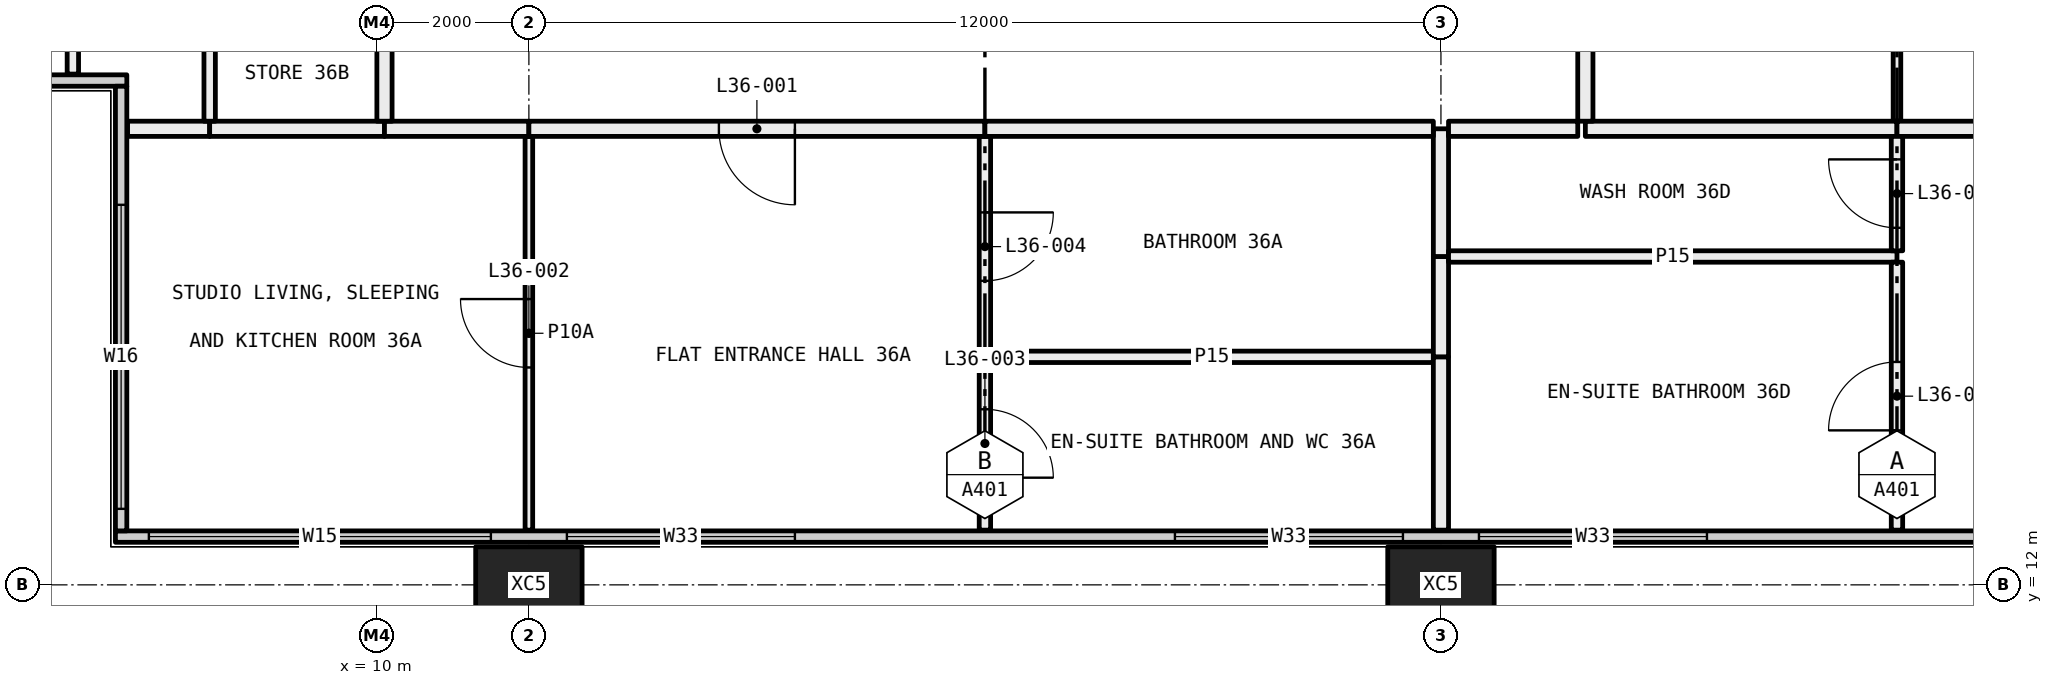
"""IFC4 building model, lengths in metres.
Left out: names, types, materials, properties, quantities, classifications, styles, units other than length and angle.
Written with IfcOpenShell. Run it as: python <this file> out.ifc"""

import sys

from ifc_helpers import new_model, si_unit, direction, frame, frame_2d, origin, origin_2d, place, context, subcontext, project, spatial, rectangle, hollow_rectangle, extrude, element, fill, save


model = new_model("IFC4")
c1 = context("Model", 3, precision=1e-05, world=origin(), true_north=direction((0.0, 1.0)))
c2 = subcontext(c1, "Body", "Model", "MODEL_VIEW")
j1 = project(units=[si_unit("LENGTHUNIT", "METRE"), si_unit("PLANEANGLEUNIT", "RADIAN")], contexts=[c1])
p1 = place(None, origin())
s1 = spatial("IfcSite", under=j1, at=p1, CompositionType="ELEMENT")
p2 = place(p1, origin())
s2 = spatial("IfcBuilding", under=s1, at=p2, CompositionType="ELEMENT")
p3 = place(p2, frame((0.0, 0.0, 138.0)))
s3 = spatial("IfcBuildingStorey", under=s2, at=p3, CompositionType="ELEMENT", Elevation=138.0)
for number, where, z_axis, x_axis in (
    (1, (12.0, 12.0, -0.4), (0.0, 0.0, 1.0), (1.0, 0.0, 0.0)),
    (2, (24.0, 12.0, -0.4), (0.0, 0.0, 1.0), (1.0, 0.0, 0.0)),
):
    element("IfcColumn", number, at=place(p3, frame(where, z_axis=z_axis, x_axis=x_axis)), inside=s3, PredefinedType="COLUMN", context=c2, shape_type="SweptSolid", body=[
        extrude(hollow_rectangle(XDim=1.4, YDim=1.0, WallThickness=0.055, at=origin_2d()), origin(), (0.0, 0.0, 1.0), 3.45),
    ])
p4 = place(p3, frame((6.56, 12.635, 0.0), z_axis=(0.0, 0.0, 1.0), x_axis=(1.0, 0.0, 0.0)))
e3 = element("IfcWall", 3, at=p4, inside=s3, PredefinedType="ELEMENTEDWALL", context=c2, shape_type="SweptSolid", body=[
    extrude(rectangle(XDim=58.88, YDim=0.15, at=frame_2d((29.44, 0.0))), origin(), (0.0, 0.0, 1.0), 3.05),
])
p5 = place(p4, frame((0.44, 0.0, 0.45)))
e4 = element("IfcOpeningElement", 4, at=p5, cuts=e3, PredefinedType="OPENING", context=c2, shape_type="SweptSolid", body=[
    extrude(rectangle(XDim=4.5, YDim=2.55, at=frame_2d((2.25, 1.275))), frame((0.0, 0.085, 0.0), z_axis=(0.0, -1.0, 0.0), x_axis=(1.0, 0.0, 0.0)), (0.0, 0.0, 1.0), 0.17),
])
p6 = place(p4, frame((5.94, 0.0, 0.45)))
e5 = element("IfcOpeningElement", 5, at=p6, cuts=e3, PredefinedType="OPENING", context=c2, shape_type="SweptSolid", body=[
    extrude(rectangle(XDim=3.0, YDim=2.55, at=frame_2d((1.5, 1.275))), frame((0.0, 0.085, 0.0), z_axis=(0.0, -1.0, 0.0), x_axis=(1.0, 0.0, 0.0)), (0.0, 0.0, 1.0), 0.17),
])
p7 = place(p4, frame((13.94, 0.0, 0.45)))
e6 = element("IfcOpeningElement", 6, at=p7, cuts=e3, PredefinedType="OPENING", context=c2, shape_type="SweptSolid", body=[
    extrude(rectangle(XDim=3.0, YDim=2.55, at=frame_2d((1.5, 1.275))), frame((0.0, 0.085, 0.0), z_axis=(0.0, -1.0, 0.0), x_axis=(1.0, 0.0, 0.0)), (0.0, 0.0, 1.0), 0.17),
])
p8 = place(p4, frame((17.94, 0.0, 0.45)))
e7 = element("IfcOpeningElement", 7, at=p8, cuts=e3, PredefinedType="OPENING", context=c2, shape_type="SweptSolid", body=[
    extrude(rectangle(XDim=3.0, YDim=2.55, at=frame_2d((1.5, 1.275))), frame((0.0, 0.085, 0.0), z_axis=(0.0, -1.0, 0.0), x_axis=(1.0, 0.0, 0.0)), (0.0, 0.0, 1.0), 0.17),
])
p9 = place(p4, frame((26.94, 0.0, 0.45)))
e8 = element("IfcOpeningElement", 8, at=p9, cuts=e3, PredefinedType="OPENING", context=c2, shape_type="SweptSolid", body=[
    extrude(rectangle(XDim=2.0, YDim=2.55, at=frame_2d((1.0, 1.275))), frame((0.0, 0.085, 0.0), z_axis=(0.0, -1.0, 0.0), x_axis=(1.0, 0.0, 0.0)), (0.0, 0.0, 1.0), 0.17),
])
p10 = place(p4, frame((29.94, 0.0, 0.45)))
e9 = element("IfcOpeningElement", 9, at=p10, cuts=e3, PredefinedType="OPENING", context=c2, shape_type="SweptSolid", body=[
    extrude(rectangle(XDim=3.0, YDim=2.55, at=frame_2d((1.5, 1.275))), frame((0.0, 0.085, 0.0), z_axis=(0.0, -1.0, 0.0), x_axis=(1.0, 0.0, 0.0)), (0.0, 0.0, 1.0), 0.17),
])
p11 = place(p4, frame((37.94, 0.0, 0.45)))
e10 = element("IfcOpeningElement", 10, at=p11, cuts=e3, PredefinedType="OPENING", context=c2, shape_type="SweptSolid", body=[
    extrude(rectangle(XDim=3.0, YDim=2.55, at=frame_2d((1.5, 1.275))), frame((0.0, 0.085, 0.0), z_axis=(0.0, -1.0, 0.0), x_axis=(1.0, 0.0, 0.0)), (0.0, 0.0, 1.0), 0.17),
])
p12 = place(p4, frame((41.94, 0.0, 0.45)))
e11 = element("IfcOpeningElement", 11, at=p12, cuts=e3, PredefinedType="OPENING", context=c2, shape_type="SweptSolid", body=[
    extrude(rectangle(XDim=3.0, YDim=2.55, at=frame_2d((1.5, 1.275))), frame((0.0, 0.085, 0.0), z_axis=(0.0, -1.0, 0.0), x_axis=(1.0, 0.0, 0.0)), (0.0, 0.0, 1.0), 0.17),
])
p13 = place(p4, frame((50.94, 0.0, 0.45)))
e12 = element("IfcOpeningElement", 12, at=p13, cuts=e3, PredefinedType="OPENING", context=c2, shape_type="SweptSolid", body=[
    extrude(rectangle(XDim=2.0, YDim=2.55, at=frame_2d((1.0, 1.275))), frame((0.0, 0.085, 0.0), z_axis=(0.0, -1.0, 0.0), x_axis=(1.0, 0.0, 0.0)), (0.0, 0.0, 1.0), 0.17),
])
p14 = place(p4, frame((53.94, 0.0, 0.45)))
e13 = element("IfcOpeningElement", 13, at=p14, cuts=e3, PredefinedType="OPENING", context=c2, shape_type="SweptSolid", body=[
    extrude(rectangle(XDim=4.5, YDim=2.55, at=frame_2d((2.25, 1.275))), frame((0.0, 0.085, 0.0), z_axis=(0.0, -1.0, 0.0), x_axis=(1.0, 0.0, 0.0)), (0.0, 0.0, 1.0), 0.17),
])
p15 = place(p3, frame((0.56, 18.635, 0.0), z_axis=(0.0, 0.0, 1.0), x_axis=(1.0, 0.0, 0.0)))
e14 = element("IfcWall", 14, at=p15, inside=s3, PredefinedType="ELEMENTEDWALL", context=c2, shape_type="SweptSolid", body=[
    extrude(rectangle(XDim=6.15, YDim=0.15, at=frame_2d((3.075, 0.0))), origin(), (0.0, 0.0, 1.0), 3.05),
])
p16 = place(p15, frame((0.44, 0.0, 0.45)))
e15 = element("IfcOpeningElement", 15, at=p16, cuts=e14, PredefinedType="OPENING", context=c2, shape_type="SweptSolid", body=[
    extrude(rectangle(XDim=4.0, YDim=2.55, at=frame_2d((2.0, 1.275))), frame((0.0, 0.085, 0.0), z_axis=(0.0, -1.0, 0.0), x_axis=(1.0, 0.0, 0.0)), (0.0, 0.0, 1.0), 0.17),
])
p17 = place(p3, frame((6.635, 12.71, 0.0), z_axis=(0.0, 0.0, 1.0), x_axis=(0.0, 1.0, 0.0)))
e16 = element("IfcWall", 16, at=p17, inside=s3, PredefinedType="ELEMENTEDWALL", context=c2, shape_type="SweptSolid", body=[
    extrude(rectangle(XDim=5.85, YDim=0.15, at=frame_2d((2.925, 0.0))), origin(), (0.0, 0.0, 1.0), 3.05),
])
p18 = place(p17, frame((0.29, 0.0, 0.45)))
e17 = element("IfcOpeningElement", 17, at=p18, cuts=e16, PredefinedType="OPENING", context=c2, shape_type="SweptSolid", body=[
    extrude(rectangle(XDim=4.0, YDim=2.55, at=frame_2d((2.0, 1.275))), frame((0.0, 0.085, 0.0), z_axis=(0.0, -1.0, 0.0), x_axis=(1.0, 0.0, 0.0)), (0.0, 0.0, 1.0), 0.17),
])
p19 = place(p3, frame((12.0, 12.72, 0.0), z_axis=(0.0, 0.0, 1.0), x_axis=(0.0, 1.0, 0.0)))
e18 = element("IfcWall", 18, at=p19, inside=s3, PredefinedType="PARTITIONING", context=c2, shape_type="SweptSolid", body=[
    extrude(rectangle(XDim=5.18, YDim=0.1, at=frame_2d((2.59, 0.0))), origin(), (0.0, 0.0, 1.0), 3.05),
])
p20 = place(p19, frame((2.14, 0.0, 0.0)))
e19 = element("IfcOpeningElement", 19, at=p20, cuts=e18, PredefinedType="OPENING", context=c2, shape_type="SweptSolid", body=[
    extrude(rectangle(XDim=0.9, YDim=2.1, at=frame_2d((0.45, 1.05))), frame((0.0, 0.06, 0.0), z_axis=(0.0, -1.0, 0.0), x_axis=(1.0, 0.0, 0.0)), (0.0, 0.0, 1.0), 0.12),
])
p21 = place(p3, frame((7.8, 18.0, 0.0), z_axis=(0.0, 0.0, 1.0), x_axis=(-1.0, 0.0, 0.0)))
e20 = element("IfcWall", 20, at=p21, inside=s3, PredefinedType="PARTITIONING", context=c2, shape_type="SweptSolid", body=[
    extrude(rectangle(XDim=1.08, YDim=0.2, at=frame_2d((0.54, 0.0))), origin(), (0.0, 0.0, 1.0), 3.05),
])
p22 = place(p3, frame((10.1, 18.0, 0.0), z_axis=(0.0, 0.0, 1.0), x_axis=(-1.0, 0.0, 0.0)))
e21 = element("IfcWall", 21, at=p22, inside=s3, PredefinedType="PARTITIONING", context=c2, shape_type="SweptSolid", body=[
    extrude(rectangle(XDim=2.3, YDim=0.2, at=frame_2d((1.15, 0.0))), origin(), (0.0, 0.0, 1.0), 3.05),
])
p23 = place(p3, frame((12.0, 18.0, 0.0), z_axis=(0.0, 0.0, 1.0), x_axis=(-1.0, 0.0, 0.0)))
e22 = element("IfcWall", 22, at=p23, inside=s3, PredefinedType="PARTITIONING", context=c2, shape_type="SweptSolid", body=[
    extrude(rectangle(XDim=1.9, YDim=0.2, at=frame_2d((0.95, 0.0))), origin(), (0.0, 0.0, 1.0), 3.05),
])
p24 = place(p3, frame((18.0, 12.72, 0.0), z_axis=(0.0, 0.0, 1.0), x_axis=(0.0, 1.0, 0.0)))
e23 = element("IfcWall", 23, at=p24, inside=s3, PredefinedType="PARTITIONING", context=c2, shape_type="SweptSolid", body=[
    extrude(rectangle(XDim=2.28, YDim=0.15, at=frame_2d((1.14, 0.0))), origin(), (0.0, 0.0, 1.0), 3.05),
])
p25 = place(p24, frame((0.69, 0.0, 0.0)))
e24 = element("IfcOpeningElement", 24, at=p25, cuts=e23, PredefinedType="OPENING", context=c2, shape_type="SweptSolid", body=[
    extrude(rectangle(XDim=0.9, YDim=2.1, at=frame_2d((0.45, 1.05))), frame((0.0, 0.085, 0.0), z_axis=(0.0, -1.0, 0.0), x_axis=(1.0, 0.0, 0.0)), (0.0, 0.0, 1.0), 0.17),
])
p26 = place(p3, frame((18.0, 15.0, 0.0), z_axis=(0.0, 0.0, 1.0), x_axis=(0.0, 1.0, 0.0)))
e25 = element("IfcWall", 25, at=p26, inside=s3, PredefinedType="PARTITIONING", context=c2, shape_type="SweptSolid", body=[
    extrude(rectangle(XDim=2.9, YDim=0.15, at=frame_2d((1.45, 0.0))), origin(), (0.0, 0.0, 1.0), 3.05),
])
p27 = place(p26, frame((1.0, 0.0, 0.0)))
e26 = element("IfcOpeningElement", 26, at=p27, cuts=e25, PredefinedType="OPENING", context=c2, shape_type="SweptSolid", body=[
    extrude(rectangle(XDim=0.9, YDim=2.1, at=frame_2d((0.45, 1.05))), frame((0.0, 0.085, 0.0), z_axis=(0.0, -1.0, 0.0), x_axis=(1.0, 0.0, 0.0)), (0.0, 0.0, 1.0), 0.17),
])
p28 = place(p3, frame((18.0, 18.0, 0.0), z_axis=(0.0, 0.0, 1.0), x_axis=(-1.0, 0.0, 0.0)))
e27 = element("IfcWall", 27, at=p28, inside=s3, PredefinedType="PARTITIONING", context=c2, shape_type="SweptSolid", body=[
    extrude(rectangle(XDim=6.0, YDim=0.2, at=frame_2d((3.0, 0.0))), origin(), (0.0, 0.0, 1.0), 3.05),
])
p29 = place(p28, frame((2.5, 0.0, 0.0)))
e28 = element("IfcOpeningElement", 28, at=p29, cuts=e27, PredefinedType="OPENING", context=c2, shape_type="SweptSolid", body=[
    extrude(rectangle(XDim=1.0, YDim=2.1, at=frame_2d((0.5, 1.05))), frame((0.0, 0.11, 0.0), z_axis=(0.0, -1.0, 0.0), x_axis=(1.0, 0.0, 0.0)), (0.0, 0.0, 1.0), 0.22),
])
p30 = place(p3, frame((23.9, 15.0, 0.0), z_axis=(0.0, 0.0, 1.0), x_axis=(-1.0, 0.0, 0.0)))
e29 = element("IfcWall", 29, at=p30, inside=s3, PredefinedType="PARTITIONING", context=c2, shape_type="SweptSolid", body=[
    extrude(rectangle(XDim=5.825, YDim=0.15, at=frame_2d((2.913, 0.0))), origin(), (0.0, 0.0, 1.0), 3.05),
])
p31 = place(p3, frame((24.0, 12.72, 0.0), z_axis=(0.0, 0.0, 1.0), x_axis=(0.0, 1.0, 0.0)))
e30 = element("IfcWall", 30, at=p31, inside=s3, PredefinedType="PARTITIONING", context=c2, shape_type="SweptSolid", body=[
    extrude(rectangle(XDim=2.28, YDim=0.2, at=frame_2d((1.14, 0.0))), origin(), (0.0, 0.0, 1.0), 3.05),
])
p32 = place(p3, frame((24.0, 15.0, 0.0), z_axis=(0.0, 0.0, 1.0), x_axis=(0.0, 1.0, 0.0)))
e31 = element("IfcWall", 31, at=p32, inside=s3, PredefinedType="PARTITIONING", context=c2, shape_type="SweptSolid", body=[
    extrude(rectangle(XDim=1.32, YDim=0.2, at=frame_2d((0.66, 0.0))), origin(), (0.0, 0.0, 1.0), 3.05),
])
p33 = place(p3, frame((24.0, 16.32, 0.0), z_axis=(0.0, 0.0, 1.0), x_axis=(0.0, 1.0, 0.0)))
e32 = element("IfcWall", 32, at=p33, inside=s3, PredefinedType="PARTITIONING", context=c2, shape_type="SweptSolid", body=[
    extrude(rectangle(XDim=1.68, YDim=0.2, at=frame_2d((0.84, 0.0))), origin(), (0.0, 0.0, 1.0), 3.05),
])
p34 = place(p3, frame((23.9, 18.0, 0.0), z_axis=(0.0, 0.0, 1.0), x_axis=(-1.0, 0.0, 0.0)))
e33 = element("IfcWall", 33, at=p34, inside=s3, PredefinedType="PARTITIONING", context=c2, shape_type="SweptSolid", body=[
    extrude(rectangle(XDim=5.9, YDim=0.2, at=frame_2d((2.95, 0.0))), origin(), (0.0, 0.0, 1.0), 3.05),
])
p35 = place(p3, frame((6.0, 18.72, 0.0), z_axis=(0.0, 0.0, 1.0), x_axis=(0.0, 1.0, 0.0)))
e34 = element("IfcWall", 34, at=p35, inside=s3, PredefinedType="PARTITIONING", context=c2, shape_type="SweptSolid", body=[
    extrude(rectangle(XDim=2.28, YDim=0.15, at=frame_2d((1.14, 0.0))), origin(), (0.0, 0.0, 1.0), 3.05),
])
p36 = place(p3, frame((7.8, 18.1, 0.0), z_axis=(0.0, 0.0, 1.0), x_axis=(0.0, 1.0, 0.0)))
e35 = element("IfcWall", 35, at=p36, inside=s3, PredefinedType="PARTITIONING", context=c2, shape_type="SweptSolid", body=[
    extrude(rectangle(XDim=2.9, YDim=0.15, at=frame_2d((1.45, 0.0))), origin(), (0.0, 0.0, 1.0), 3.05),
])
p37 = place(p3, frame((10.1, 18.1, 0.0), z_axis=(0.0, 0.0, 1.0), x_axis=(0.0, 1.0, 0.0)))
e36 = element("IfcWall", 36, at=p37, inside=s3, PredefinedType="PARTITIONING", context=c2, shape_type="SweptSolid", body=[
    extrude(rectangle(XDim=2.9, YDim=0.2, at=frame_2d((1.45, 0.0))), origin(), (0.0, 0.0, 1.0), 3.05),
])
p38 = place(p3, frame((30.0, 18.1, 0.0), z_axis=(0.0, 0.0, 1.0), x_axis=(0.0, 1.0, 0.0)))
e37 = element("IfcWall", 37, at=p38, inside=s3, PredefinedType="PARTITIONING", context=c2, shape_type="SweptSolid", body=[
    extrude(rectangle(XDim=6.2, YDim=0.1, at=frame_2d((3.1, 0.0))), origin(), (0.0, 0.0, 1.0), 2.45),
])
p39 = place(p3, frame((25.9, 18.0, 0.0), z_axis=(0.0, 0.0, 1.0), x_axis=(1.0, 0.0, 0.0)))
e38 = element("IfcWall", 38, at=p39, inside=s3, PredefinedType="PARTITIONING", context=c2, shape_type="SweptSolid", body=[
    extrude(rectangle(XDim=4.1, YDim=0.2, at=frame_2d((2.05, 0.0))), origin(), (0.0, 0.0, 1.0), 3.05),
])
p40 = place(p3, frame((25.9, 23.9, 0.0), z_axis=(0.0, 0.0, 1.0), x_axis=(0.0, -1.0, 0.0)))
e39 = element("IfcWall", 39, at=p40, inside=s3, PredefinedType="PARTITIONING", context=c2, shape_type="SweptSolid", body=[
    extrude(rectangle(XDim=5.8, YDim=0.2, at=frame_2d((2.9, 0.0))), origin(), (0.0, 0.0, 1.0), 3.05),
])
p41 = place(p3, frame((30.0, 18.0, 0.0), z_axis=(0.0, 0.0, 1.0), x_axis=(1.0, 0.0, 0.0)))
e40 = element("IfcWall", 40, at=p41, inside=s3, PredefinedType="PARTITIONING", context=c2, shape_type="SweptSolid", body=[
    extrude(rectangle(XDim=6.0, YDim=0.2, at=frame_2d((3.0, 0.0))), origin(), (0.0, 0.0, 1.0), 2.45),
])
p42 = place(p3, frame((30.0, 16.32, 0.0), z_axis=(0.0, 0.0, 1.0), x_axis=(-1.0, 0.0, 0.0)))
e41 = element("IfcWall", 41, at=p42, inside=s3, PredefinedType="PARTITIONING", context=c2, shape_type="SweptSolid", body=[
    extrude(rectangle(XDim=5.9, YDim=0.15, at=frame_2d((2.95, 0.0))), origin(), (0.0, 0.0, 1.0), 3.05),
])
p43 = place(p3, frame((30.0, 12.72, 0.0), z_axis=(0.0, 0.0, 1.0), x_axis=(0.0, 1.0, 0.0)))
e42 = element("IfcWall", 42, at=p43, inside=s3, PredefinedType="PARTITIONING", context=c2, shape_type="SweptSolid", body=[
    extrude(rectangle(XDim=3.525, YDim=0.15, at=frame_2d((1.763, 0.0))), origin(), (0.0, 0.0, 1.0), 3.05),
])
p44 = place(p43, frame((1.312, 0.0, 0.0)))
e43 = element("IfcOpeningElement", 43, at=p44, cuts=e42, PredefinedType="OPENING", context=c2, shape_type="SweptSolid", body=[
    extrude(rectangle(XDim=0.9, YDim=2.1, at=frame_2d((0.45, 1.05))), frame((0.0, 0.085, 0.0), z_axis=(0.0, -1.0, 0.0), x_axis=(1.0, 0.0, 0.0)), (0.0, 0.0, 1.0), 0.17),
])
p45 = place(p3, frame((30.0, 16.395, 0.0), z_axis=(0.0, 0.0, 1.0), x_axis=(0.0, 1.0, 0.0)))
e44 = element("IfcWall", 44, at=p45, inside=s3, PredefinedType="PARTITIONING", context=c2, shape_type="SweptSolid", body=[
    extrude(rectangle(XDim=1.505, YDim=0.15, at=frame_2d((0.752, 0.0))), origin(), (0.0, 0.0, 1.0), 3.05),
])
p46 = place(p45, frame((0.302, 0.0, 0.0)))
e45 = element("IfcOpeningElement", 45, at=p46, cuts=e44, PredefinedType="OPENING", context=c2, shape_type="SweptSolid", body=[
    extrude(rectangle(XDim=0.9, YDim=2.1, at=frame_2d((0.45, 1.05))), frame((0.0, 0.085, 0.0), z_axis=(0.0, -1.0, 0.0), x_axis=(1.0, 0.0, 0.0)), (0.0, 0.0, 1.0), 0.17),
])
p47 = place(p3, frame((25.8, 18.0, 0.0), z_axis=(0.0, 0.0, 1.0), x_axis=(-1.0, 0.0, 0.0)))
e46 = element("IfcWall", 46, at=p47, inside=s3, PredefinedType="PARTITIONING", context=c2, shape_type="SweptSolid", body=[
    extrude(rectangle(XDim=1.7, YDim=0.2, at=frame_2d((0.85, 0.0))), origin(), (0.0, 0.0, 1.0), 3.05),
])
p48 = place(p5, origin())
e47 = element("IfcWindow", 47, at=p48, inside=s3, PartitioningType="SINGLE_PANEL", PredefinedType="WINDOW", context=c2, shape_type="SweptSolid", body=[
    extrude(rectangle(XDim=4.5, YDim=2.55, at=frame_2d((2.25, 1.275))), frame((0.0, 0.03, 0.0), z_axis=(0.0, -1.0, 0.0), x_axis=(1.0, 0.0, 0.0)), (0.0, 0.0, 1.0), 0.06),
])
fill(e4, e47)
p49 = place(p6, origin())
e48 = element("IfcWindow", 48, at=p49, inside=s3, PartitioningType="SINGLE_PANEL", PredefinedType="WINDOW", context=c2, shape_type="SweptSolid", body=[
    extrude(rectangle(XDim=3.0, YDim=2.55, at=frame_2d((1.5, 1.275))), frame((0.0, 0.03, 0.0), z_axis=(0.0, -1.0, 0.0), x_axis=(1.0, 0.0, 0.0)), (0.0, 0.0, 1.0), 0.06),
])
fill(e5, e48)
p50 = place(p7, origin())
e49 = element("IfcWindow", 49, at=p50, inside=s3, PartitioningType="SINGLE_PANEL", PredefinedType="WINDOW", context=c2, shape_type="SweptSolid", body=[
    extrude(rectangle(XDim=3.0, YDim=2.55, at=frame_2d((1.5, 1.275))), frame((0.0, 0.03, 0.0), z_axis=(0.0, -1.0, 0.0), x_axis=(1.0, 0.0, 0.0)), (0.0, 0.0, 1.0), 0.06),
])
fill(e6, e49)
p51 = place(p8, origin())
e50 = element("IfcWindow", 50, at=p51, inside=s3, PartitioningType="SINGLE_PANEL", PredefinedType="WINDOW", context=c2, shape_type="SweptSolid", body=[
    extrude(rectangle(XDim=3.0, YDim=2.55, at=frame_2d((1.5, 1.275))), frame((0.0, 0.03, 0.0), z_axis=(0.0, -1.0, 0.0), x_axis=(1.0, 0.0, 0.0)), (0.0, 0.0, 1.0), 0.06),
])
fill(e7, e50)
p52 = place(p18, origin())
e51 = element("IfcWindow", 51, at=p52, inside=s3, PartitioningType="SINGLE_PANEL", PredefinedType="WINDOW", context=c2, shape_type="SweptSolid", body=[
    extrude(rectangle(XDim=4.0, YDim=2.55, at=frame_2d((2.0, 1.275))), frame((0.0, 0.03, 0.0), z_axis=(0.0, -1.0, 0.0), x_axis=(1.0, 0.0, 0.0)), (0.0, 0.0, 1.0), 0.06),
])
fill(e17, e51)
p53 = place(p29, origin())
e52 = element("IfcDoor", 52, at=p53, inside=s3, OperationType="SINGLE_SWING_RIGHT", PredefinedType="DOOR", context=c2, shape_type="SweptSolid", body=[
    extrude(rectangle(XDim=1.0, YDim=2.1, at=frame_2d((0.5, 1.05))), frame((0.0, 0.025, 0.0), z_axis=(0.0, -1.0, 0.0), x_axis=(1.0, 0.0, 0.0)), (0.0, 0.0, 1.0), 0.05),
])
fill(e28, e52)
p54 = place(p20, origin())
e53 = element("IfcDoor", 53, at=p54, inside=s3, OperationType="SINGLE_SWING_LEFT", PredefinedType="DOOR", context=c2, shape_type="SweptSolid", body=[
    extrude(rectangle(XDim=0.9, YDim=2.1, at=frame_2d((0.45, 1.05))), frame((0.0, 0.025, 0.0), z_axis=(0.0, -1.0, 0.0), x_axis=(1.0, 0.0, 0.0)), (0.0, 0.0, 1.0), 0.05),
])
fill(e19, e53)
p55 = place(p25, frame((0.9, 0.0, 0.0), x_axis=(-1.0, 0.0, 0.0)))
e54 = element("IfcDoor", 54, at=p55, inside=s3, OperationType="SINGLE_SWING_LEFT", PredefinedType="DOOR", context=c2, shape_type="SweptSolid", body=[
    extrude(rectangle(XDim=0.9, YDim=2.1, at=frame_2d((0.45, 1.05))), frame((0.0, 0.025, 0.0), z_axis=(0.0, -1.0, 0.0), x_axis=(1.0, 0.0, 0.0)), (0.0, 0.0, 1.0), 0.05),
])
fill(e24, e54)
p56 = place(p27, frame((0.9, 0.0, 0.0), x_axis=(-1.0, 0.0, 0.0)))
e55 = element("IfcDoor", 55, at=p56, inside=s3, OperationType="SINGLE_SWING_RIGHT", PredefinedType="DOOR", context=c2, shape_type="SweptSolid", body=[
    extrude(rectangle(XDim=0.9, YDim=2.1, at=frame_2d((0.45, 1.05))), frame((0.0, 0.025, 0.0), z_axis=(0.0, -1.0, 0.0), x_axis=(1.0, 0.0, 0.0)), (0.0, 0.0, 1.0), 0.05),
])
fill(e26, e55)
p57 = place(p44, origin())
e56 = element("IfcDoor", 56, at=p57, inside=s3, OperationType="SINGLE_SWING_RIGHT", PredefinedType="DOOR", context=c2, shape_type="SweptSolid", body=[
    extrude(rectangle(XDim=0.9, YDim=2.1, at=frame_2d((0.45, 1.05))), frame((0.0, 0.025, 0.0), z_axis=(0.0, -1.0, 0.0), x_axis=(1.0, 0.0, 0.0)), (0.0, 0.0, 1.0), 0.05),
])
fill(e43, e56)
p58 = place(p46, origin())
e57 = element("IfcDoor", 57, at=p58, inside=s3, OperationType="SINGLE_SWING_LEFT", PredefinedType="DOOR", context=c2, shape_type="SweptSolid", body=[
    extrude(rectangle(XDim=0.9, YDim=2.1, at=frame_2d((0.45, 1.05))), frame((0.0, 0.025, 0.0), z_axis=(0.0, -1.0, 0.0), x_axis=(1.0, 0.0, 0.0)), (0.0, 0.0, 1.0), 0.05),
])
fill(e45, e57)
save(model, sys.argv[1])
